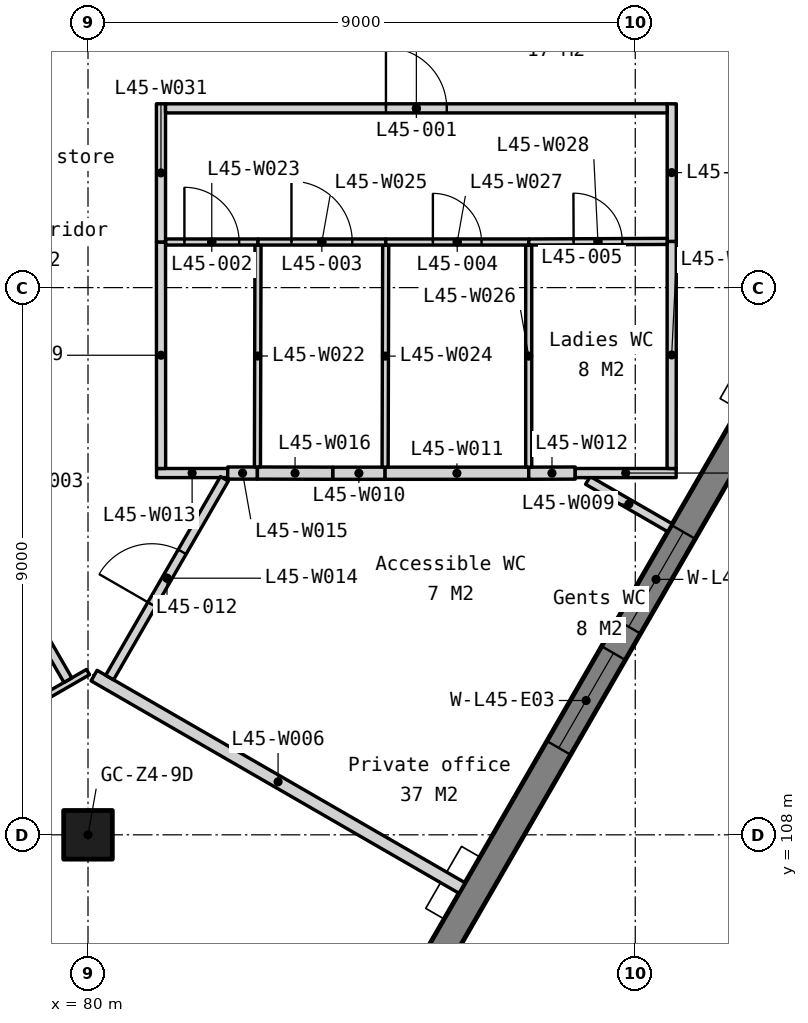
"""IFC4 building model, lengths in metres.
Left out: names, types, materials, properties, quantities, classifications, styles, units other than length and angle.
Written with IfcOpenShell. Run it as: python <this file> out.ifc"""

import sys

from ifc_helpers import new_model, si_unit, direction, frame, frame_2d, origin, origin_2d, place, context, subcontext, project, spatial, polyline, rectangle, outline, extrude, element, fill, save


model = new_model("IFC4")
c1 = context("Model", 3, precision=1e-05, world=origin(), true_north=direction((0.0, 1.0)))
c2 = subcontext(c1, "Body", "Model", "MODEL_VIEW")
j1 = project(units=[si_unit("LENGTHUNIT", "METRE"), si_unit("PLANEANGLEUNIT", "RADIAN")], contexts=[c1])
p1 = place(None, origin())
s1 = spatial("IfcSite", under=j1, at=p1, CompositionType="ELEMENT")
p2 = place(p1, origin())
s2 = spatial("IfcBuilding", under=s1, at=p2, CompositionType="ELEMENT")
p3 = place(p2, frame((0.0, 0.0, 180.2)))
s3 = spatial("IfcBuildingStorey", under=s2, at=p3, CompositionType="ELEMENT", Elevation=180.2)
p4 = place(p3, frame((80.0, 108.0, 0.0), z_axis=(0.0, 0.0, 1.0), x_axis=(1.0, 0.0, 0.0)))
e1 = element("IfcColumn", 1, at=p4, inside=s3, PredefinedType="COLUMN", context=c2, shape_type="SweptSolid", body=[
    extrude(rectangle(XDim=0.8, YDim=0.8, at=origin_2d()), origin(), (0.0, 0.0, 1.0), 3.9),
])
p5 = place(p3, frame((81.505, 98.627, -0.45), z_axis=(0.0, 0.0, 1.0), x_axis=(0.500002199942, 0.866024133644, 0.0)))
e2 = element("IfcWall", 2, at=p5, inside=s3, PredefinedType="SOLIDWALL", context=c2, shape_type="SweptSolid", body=[
    extrude(outline(polyline([(38.729, 0.0), (38.729, 4.2), (0.0, 4.2), (0.0, 0.0), (38.729, 0.0)])), frame((0.0, 0.225, 0.0), z_axis=(0.0, -1.0, 0.0), x_axis=(1.0, 0.0, 0.0)), (0.0, 0.0, 1.0), 0.45),
])
p6 = place(p5, frame((2.791, 0.0, 1.25)))
e3 = element("IfcOpeningElement", 3, at=p6, cuts=e2, PredefinedType="OPENING", context=c2, shape_type="SweptSolid", body=[
    extrude(rectangle(XDim=1.8, YDim=2.2, at=frame_2d((0.9, 1.1))), frame((0.0, 0.235, 0.0), z_axis=(0.0, -1.0, 0.0), x_axis=(1.0, 0.0, 0.0)), (0.0, 0.0, 1.0), 0.47),
])
p7 = place(p5, frame((5.091, 0.0, 1.25)))
e4 = element("IfcOpeningElement", 4, at=p7, cuts=e2, PredefinedType="OPENING", context=c2, shape_type="SweptSolid", body=[
    extrude(rectangle(XDim=1.8, YDim=2.2, at=frame_2d((0.9, 1.1))), frame((0.0, 0.235, 0.0), z_axis=(0.0, -1.0, 0.0), x_axis=(1.0, 0.0, 0.0)), (0.0, 0.0, 1.0), 0.47),
])
p8 = place(p5, frame((12.473, 0.0, 1.25)))
e5 = element("IfcOpeningElement", 5, at=p8, cuts=e2, PredefinedType="OPENING", context=c2, shape_type="SweptSolid", body=[
    extrude(rectangle(XDim=1.8, YDim=2.2, at=frame_2d((0.9, 1.1))), frame((0.0, 0.235, 0.0), z_axis=(0.0, -1.0, 0.0), x_axis=(1.0, 0.0, 0.0)), (0.0, 0.0, 1.0), 0.47),
])
p9 = place(p5, frame((14.773, 0.0, 1.25)))
e6 = element("IfcOpeningElement", 6, at=p9, cuts=e2, PredefinedType="OPENING", context=c2, shape_type="SweptSolid", body=[
    extrude(rectangle(XDim=1.8, YDim=2.2, at=frame_2d((0.9, 1.1))), frame((0.0, 0.235, 0.0), z_axis=(0.0, -1.0, 0.0), x_axis=(1.0, 0.0, 0.0)), (0.0, 0.0, 1.0), 0.47),
])
p10 = place(p5, frame((22.156, 0.0, 1.25)))
e7 = element("IfcOpeningElement", 7, at=p10, cuts=e2, PredefinedType="OPENING", context=c2, shape_type="SweptSolid", body=[
    extrude(rectangle(XDim=1.8, YDim=2.2, at=frame_2d((0.9, 1.1))), frame((0.0, 0.235, 0.0), z_axis=(0.0, -1.0, 0.0), x_axis=(1.0, 0.0, 0.0)), (0.0, 0.0, 1.0), 0.47),
])
p11 = place(p5, frame((24.456, 0.0, 1.25)))
e8 = element("IfcOpeningElement", 8, at=p11, cuts=e2, PredefinedType="OPENING", context=c2, shape_type="SweptSolid", body=[
    extrude(rectangle(XDim=1.8, YDim=2.2, at=frame_2d((0.9, 1.1))), frame((0.0, 0.235, 0.0), z_axis=(0.0, -1.0, 0.0), x_axis=(1.0, 0.0, 0.0)), (0.0, 0.0, 1.0), 0.47),
])
p12 = place(p5, frame((31.838, 0.0, 1.25)))
e9 = element("IfcOpeningElement", 9, at=p12, cuts=e2, PredefinedType="OPENING", context=c2, shape_type="SweptSolid", body=[
    extrude(rectangle(XDim=1.8, YDim=2.2, at=frame_2d((0.9, 1.1))), frame((0.0, 0.235, 0.0), z_axis=(0.0, -1.0, 0.0), x_axis=(1.0, 0.0, 0.0)), (0.0, 0.0, 1.0), 0.47),
])
p13 = place(p5, frame((34.138, 0.0, 1.25)))
e10 = element("IfcOpeningElement", 10, at=p13, cuts=e2, PredefinedType="OPENING", context=c2, shape_type="SweptSolid", body=[
    extrude(rectangle(XDim=1.8, YDim=2.2, at=frame_2d((0.9, 1.1))), frame((0.0, 0.235, 0.0), z_axis=(0.0, -1.0, 0.0), x_axis=(1.0, 0.0, 0.0)), (0.0, 0.0, 1.0), 0.47),
])
p14 = place(p3, frame((73.849, 107.125, 0.0), z_axis=(0.0, 0.0, 1.0), x_axis=(0.866024174161, 0.500002129764, 0.0)))
e11 = element("IfcWall", 11, at=p14, inside=s3, PredefinedType="PARTITIONING", context=c2, shape_type="SweptSolid", body=[
    extrude(rectangle(XDim=7.103, YDim=0.1, at=frame_2d((3.552, 0.0))), origin(), (0.0, 0.0, 1.0), 3.75),
])
p15 = place(p14, frame((3.102, 0.0, 0.0)))
e12 = element("IfcOpeningElement", 12, at=p15, cuts=e11, PredefinedType="OPENING", context=c2, shape_type="SweptSolid", body=[
    extrude(rectangle(XDim=0.9, YDim=2.1, at=frame_2d((0.45, 1.05))), frame((0.0, 0.06, 0.0), z_axis=(0.0, -1.0, 0.0), x_axis=(1.0, 0.0, 0.0)), (0.0, 0.0, 1.0), 0.12),
])
p16 = place(p3, frame((77.274, 114.693, 0.0), z_axis=(0.0, 0.0, 1.0), x_axis=(0.499997407846, -0.86602690036, 0.0)))
e13 = element("IfcWall", 13, at=p16, inside=s3, PredefinedType="PARTITIONING", context=c2, shape_type="SweptSolid", body=[
    extrude(rectangle(XDim=4.791, YDim=0.15, at=frame_2d((2.396, 0.0))), origin(), (0.0, 0.0, 1.0), 3.75),
])
p17 = place(p16, frame((1.896, 0.0, 0.0)))
e14 = element("IfcOpeningElement", 14, at=p17, cuts=e13, PredefinedType="OPENING", context=c2, shape_type="SweptSolid", body=[
    extrude(rectangle(XDim=1.0, YDim=2.1, at=frame_2d((0.5, 1.05))), frame((0.0, 0.085, 0.0), z_axis=(0.0, -1.0, 0.0), x_axis=(1.0, 0.0, 0.0)), (0.0, 0.0, 1.0), 0.17),
])
p18 = place(p3, frame((80.1, 110.619, 0.0), z_axis=(0.0, 0.0, 1.0), x_axis=(0.866028486751, -0.499994660107, 0.0)))
e15 = element("IfcWall", 15, at=p18, inside=s3, PredefinedType="PARTITIONING", context=c2, shape_type="SweptSolid", body=[
    extrude(rectangle(XDim=6.987, YDim=0.2, at=frame_2d((3.494, 0.0))), origin(), (0.0, 0.0, 1.0), 3.75),
])
p19 = place(p3, frame((88.221, 113.83, 0.0), z_axis=(0.0, 0.0, 1.0), x_axis=(0.865997745606, -0.500047902311, 0.0)))
e16 = element("IfcWall", 16, at=p19, inside=s3, PredefinedType="PARTITIONING", context=c2, shape_type="SweptSolid", body=[
    extrude(rectangle(XDim=1.558, YDim=0.15, at=frame_2d((0.779, 0.0))), origin(), (0.0, 0.0, 1.0), 3.75),
])
p20 = place(p3, frame((84.024, 113.947, 0.0), z_axis=(0.0, 0.0, 1.0), x_axis=(1.0, 0.0, 0.0)))
e17 = element("IfcWall", 17, at=p20, inside=s3, PredefinedType="PARTITIONING", context=c2, shape_type="SweptSolid", body=[
    extrude(rectangle(XDim=0.862, YDim=0.2, at=frame_2d((0.431, 0.0))), origin(), (0.0, 0.0, 1.0), 3.75),
])
p21 = place(p3, frame((84.886, 113.947, 0.0), z_axis=(0.0, 0.0, 1.0), x_axis=(1.0, 0.0, 0.0)))
e18 = element("IfcWall", 18, at=p21, inside=s3, PredefinedType="PARTITIONING", context=c2, shape_type="SweptSolid", body=[
    extrude(rectangle(XDim=2.362, YDim=0.2, at=frame_2d((1.181, 0.0))), origin(), (0.0, 0.0, 1.0), 3.75),
])
p22 = place(p3, frame((87.248, 113.947, 0.0), z_axis=(0.0, 0.0, 1.0), x_axis=(0.9999926602, 0.003831389503, 0.0)))
e19 = element("IfcWall", 19, at=p22, inside=s3, PredefinedType="PARTITIONING", context=c2, shape_type="SweptSolid", body=[
    extrude(rectangle(XDim=0.765, YDim=0.2, at=frame_2d((0.382, 0.0))), origin(), (0.0, 0.0, 1.0), 3.75),
])
p23 = place(p3, frame((81.127, 113.95, 0.0), z_axis=(0.0, 0.0, 1.0), x_axis=(1.0, 0.0, 0.0)))
e20 = element("IfcWall", 20, at=p23, inside=s3, PredefinedType="PARTITIONING", context=c2, shape_type="SweptSolid", body=[
    extrude(rectangle(XDim=1.17, YDim=0.15, at=frame_2d((0.585, 0.0))), origin(), (0.0, 0.0, 1.0), 3.75),
])
p24 = place(p3, frame((80.356, 110.587, 0.0), z_axis=(0.0, 0.0, 1.0), x_axis=(0.500008086624, 0.86602073492, 0.0)))
e21 = element("IfcWall", 21, at=p24, inside=s3, PredefinedType="PARTITIONING", context=c2, shape_type="SweptSolid", body=[
    extrude(rectangle(XDim=3.773, YDim=0.15, at=frame_2d((1.887, 0.0))), origin(), (0.0, 0.0, 1.0), 3.75),
])
p25 = place(p24, frame((1.387, 0.0, 0.0)))
e22 = element("IfcOpeningElement", 22, at=p25, cuts=e21, PredefinedType="OPENING", context=c2, shape_type="SweptSolid", body=[
    extrude(rectangle(XDim=1.0, YDim=2.1, at=frame_2d((0.5, 1.05))), frame((0.0, 0.085, 0.0), z_axis=(0.0, -1.0, 0.0), x_axis=(1.0, 0.0, 0.0)), (0.0, 0.0, 1.0), 0.17),
])
p26 = place(p3, frame((82.297, 113.95, 0.0), z_axis=(0.0, 0.0, 1.0), x_axis=(1.0, 0.0, 0.0)))
e23 = element("IfcWall", 23, at=p26, inside=s3, PredefinedType="PARTITIONING", context=c2, shape_type="SweptSolid", body=[
    extrude(rectangle(XDim=0.489, YDim=0.2, at=frame_2d((0.244, 0.0))), origin(), (0.0, 0.0, 1.0), 3.75),
])
p27 = place(p3, frame((82.786, 113.95, 0.0), z_axis=(0.0, 0.0, 1.0), x_axis=(0.999997200094, -0.002366390535, 0.0)))
e24 = element("IfcWall", 24, at=p27, inside=s3, PredefinedType="PARTITIONING", context=c2, shape_type="SweptSolid", body=[
    extrude(rectangle(XDim=1.238, YDim=0.2, at=frame_2d((0.619, 0.0))), origin(), (0.0, 0.0, 1.0), 3.75),
])
p28 = place(p3, frame((88.013, 113.95, 0.0), z_axis=(0.0, 0.0, 1.0), x_axis=(1.0, 0.0, 0.0)))
e25 = element("IfcWall", 25, at=p28, inside=s3, PredefinedType="PARTITIONING", context=c2, shape_type="SweptSolid", body=[
    extrude(rectangle(XDim=1.66, YDim=0.15, at=frame_2d((0.83, 0.0))), origin(), (0.0, 0.0, 1.0), 3.75),
])
p29 = place(p3, frame((89.598, 114.025, 0.0), z_axis=(0.0, 0.0, 1.0), x_axis=(0.000588273642, 0.999999826967, 0.0)))
e26 = element("IfcWall", 26, at=p29, inside=s3, PredefinedType="PARTITIONING", context=c2, shape_type="SweptSolid", body=[
    extrude(rectangle(XDim=3.735, YDim=0.15, at=frame_2d((1.868, 0.0))), origin(), (0.0, 0.0, 1.0), 3.75),
])
p30 = place(p3, frame((89.6, 117.76, 0.0), z_axis=(0.0, 0.0, 1.0), x_axis=(0.0, 1.0, 0.0)))
e27 = element("IfcWall", 27, at=p30, inside=s3, PredefinedType="PARTITIONING", context=c2, shape_type="SweptSolid", body=[
    extrude(rectangle(XDim=2.263, YDim=0.15, at=frame_2d((1.131, 0.0))), origin(), (0.0, 0.0, 1.0), 3.75),
])
p31 = place(p3, frame((82.786, 114.05, 0.0), z_axis=(0.0, 0.0, 1.0), x_axis=(0.002608686776, 0.999996597371, 0.0)))
e28 = element("IfcWall", 28, at=p31, inside=s3, PredefinedType="PARTITIONING", context=c2, shape_type="SweptSolid", body=[
    extrude(rectangle(XDim=3.65, YDim=0.1, at=frame_2d((1.825, 0.0))), origin(), (0.0, 0.0, 1.0), 3.75),
])
p32 = place(p3, frame((81.275, 117.75, 0.0), z_axis=(0.0, 0.0, 1.0), x_axis=(1.0, 0.0, 0.0)))
e29 = element("IfcWall", 29, at=p32, inside=s3, PredefinedType="PARTITIONING", context=c2, shape_type="SweptSolid", body=[
    extrude(rectangle(XDim=1.521, YDim=0.1, at=frame_2d((0.76, 0.0))), origin(), (0.0, 0.0, 1.0), 3.75),
])
p33 = place(p32, frame((0.311, 0.0, 0.0)))
e30 = element("IfcOpeningElement", 30, at=p33, cuts=e29, PredefinedType="OPENING", context=c2, shape_type="SweptSolid", body=[
    extrude(rectangle(XDim=0.9, YDim=2.1, at=frame_2d((0.45, 1.05))), frame((0.0, 0.06, 0.0), z_axis=(0.0, -1.0, 0.0), x_axis=(1.0, 0.0, 0.0)), (0.0, 0.0, 1.0), 0.12),
])
p34 = place(p3, frame((84.886, 114.047, 0.0), z_axis=(0.0, 0.0, 1.0), x_axis=(0.00260659454, 0.999996602827, 0.0)))
e31 = element("IfcWall", 31, at=p34, inside=s3, PredefinedType="PARTITIONING", context=c2, shape_type="SweptSolid", body=[
    extrude(rectangle(XDim=3.653, YDim=0.1, at=frame_2d((1.826, 0.0))), origin(), (0.0, 0.0, 1.0), 3.75),
])
p35 = place(p3, frame((82.796, 117.75, 0.0), z_axis=(0.0, 0.0, 1.0), x_axis=(1.0, 0.0, 0.0)))
e32 = element("IfcWall", 32, at=p35, inside=s3, PredefinedType="PARTITIONING", context=c2, shape_type="SweptSolid", body=[
    extrude(rectangle(XDim=2.1, YDim=0.1, at=frame_2d((1.05, 0.0))), origin(), (0.0, 0.0, 1.0), 3.75),
])
p36 = place(p35, frame((0.55, 0.0, 0.0)))
e33 = element("IfcOpeningElement", 33, at=p36, cuts=e32, PredefinedType="OPENING", context=c2, shape_type="SweptSolid", body=[
    extrude(rectangle(XDim=1.0, YDim=2.1, at=frame_2d((0.5, 1.05))), frame((0.0, 0.06, 0.0), z_axis=(0.0, -1.0, 0.0), x_axis=(1.0, 0.0, 0.0)), (0.0, 0.0, 1.0), 0.12),
])
p37 = place(p3, frame((87.248, 114.047, 0.0), z_axis=(0.0, 0.0, 1.0), x_axis=(0.0, 1.0, 0.0)))
e34 = element("IfcWall", 34, at=p37, inside=s3, PredefinedType="PARTITIONING", context=c2, shape_type="SweptSolid", body=[
    extrude(rectangle(XDim=3.653, YDim=0.1, at=frame_2d((1.826, 0.0))), origin(), (0.0, 0.0, 1.0), 3.75),
])
p38 = place(p3, frame((84.896, 117.75, 0.0), z_axis=(0.0, 0.0, 1.0), x_axis=(1.0, 0.0, 0.0)))
e35 = element("IfcWall", 35, at=p38, inside=s3, PredefinedType="PARTITIONING", context=c2, shape_type="SweptSolid", body=[
    extrude(rectangle(XDim=2.352, YDim=0.1, at=frame_2d((1.176, 0.0))), origin(), (0.0, 0.0, 1.0), 3.75),
])
p39 = place(p38, frame((0.776, 0.0, 0.0)))
e36 = element("IfcOpeningElement", 36, at=p39, cuts=e35, PredefinedType="OPENING", context=c2, shape_type="SweptSolid", body=[
    extrude(rectangle(XDim=0.8, YDim=2.1, at=frame_2d((0.4, 1.05))), frame((0.0, 0.06, 0.0), z_axis=(0.0, -1.0, 0.0), x_axis=(1.0, 0.0, 0.0)), (0.0, 0.0, 1.0), 0.12),
])
p40 = place(p3, frame((87.248, 117.75, 0.0), z_axis=(0.0, 0.0, 1.0), x_axis=(0.999990802005, 0.00428904483, 0.0)))
e37 = element("IfcWall", 37, at=p40, inside=s3, PredefinedType="PARTITIONING", context=c2, shape_type="SweptSolid", body=[
    extrude(rectangle(XDim=2.277, YDim=0.1, at=frame_2d((1.138, 0.0))), origin(), (0.0, 0.0, 1.0), 3.75),
])
p41 = place(p40, frame((0.739, 0.0, 0.0)))
e38 = element("IfcOpeningElement", 38, at=p41, cuts=e37, PredefinedType="OPENING", context=c2, shape_type="SweptSolid", body=[
    extrude(rectangle(XDim=0.8, YDim=2.1, at=frame_2d((0.4, 1.05))), frame((0.0, 0.06, 0.0), z_axis=(0.0, -1.0, 0.0), x_axis=(1.0, 0.0, 0.0)), (0.0, 0.0, 1.0), 0.12),
])
p42 = place(p3, frame((81.202, 114.025, 0.0), z_axis=(0.0, 0.0, 1.0), x_axis=(-0.000524315041, 0.999999862547, 0.0)))
e39 = element("IfcWall", 39, at=p42, inside=s3, PredefinedType="PARTITIONING", context=c2, shape_type="SweptSolid", body=[
    extrude(rectangle(XDim=3.725, YDim=0.15, at=frame_2d((1.863, 0.0))), origin(), (0.0, 0.0, 1.0), 3.75),
])
p43 = place(p3, frame((81.2, 117.75, 0.0), z_axis=(0.0, 0.0, 1.0), x_axis=(0.0, 1.0, 0.0)))
e40 = element("IfcWall", 40, at=p43, inside=s3, PredefinedType="PARTITIONING", context=c2, shape_type="SweptSolid", body=[
    extrude(rectangle(XDim=2.273, YDim=0.15, at=frame_2d((1.136, 0.0))), origin(), (0.0, 0.0, 1.0), 3.75),
])
p44 = place(p3, frame((81.275, 119.948, 0.0), z_axis=(0.0, 0.0, 1.0), x_axis=(1.0, 0.0, 0.0)))
e41 = element("IfcWall", 41, at=p44, inside=s3, PredefinedType="PARTITIONING", context=c2, shape_type="SweptSolid", body=[
    extrude(rectangle(XDim=8.25, YDim=0.15, at=frame_2d((4.125, 0.0))), origin(), (0.0, 0.0, 1.0), 3.75),
])
p45 = place(p44, frame((3.625, 0.0, 0.0)))
e42 = element("IfcOpeningElement", 42, at=p45, cuts=e41, PredefinedType="OPENING", context=c2, shape_type="SweptSolid", body=[
    extrude(rectangle(XDim=1.0, YDim=2.1, at=frame_2d((0.5, 1.05))), frame((0.0, 0.085, 0.0), z_axis=(0.0, -1.0, 0.0), x_axis=(1.0, 0.0, 0.0)), (0.0, 0.0, 1.0), 0.17),
])
p46 = place(p8, origin())
e43 = element("IfcWindow", 43, at=p46, inside=s3, PartitioningType="SINGLE_PANEL", PredefinedType="WINDOW", context=c2, shape_type="SweptSolid", body=[
    extrude(rectangle(XDim=1.8, YDim=2.2, at=frame_2d((0.9, 1.1))), frame((0.0, 0.03, 0.0), z_axis=(0.0, -1.0, 0.0), x_axis=(1.0, 0.0, 0.0)), (0.0, 0.0, 1.0), 0.06),
])
fill(e5, e43)
p47 = place(p9, origin())
e44 = element("IfcWindow", 44, at=p47, inside=s3, PartitioningType="SINGLE_PANEL", PredefinedType="WINDOW", context=c2, shape_type="SweptSolid", body=[
    extrude(rectangle(XDim=1.8, YDim=2.2, at=frame_2d((0.9, 1.1))), frame((0.0, 0.03, 0.0), z_axis=(0.0, -1.0, 0.0), x_axis=(1.0, 0.0, 0.0)), (0.0, 0.0, 1.0), 0.06),
])
fill(e6, e44)
p48 = place(p45, origin())
e45 = element("IfcDoor", 45, at=p48, inside=s3, OperationType="SINGLE_SWING_LEFT", PredefinedType="DOOR", context=c2, shape_type="SweptSolid", body=[
    extrude(rectangle(XDim=1.0, YDim=2.1, at=frame_2d((0.5, 1.05))), frame((0.0, 0.025, 0.0), z_axis=(0.0, -1.0, 0.0), x_axis=(1.0, 0.0, 0.0)), (0.0, 0.0, 1.0), 0.05),
])
fill(e42, e45)
p49 = place(p33, origin())
e46 = element("IfcDoor", 46, at=p49, inside=s3, OperationType="SINGLE_SWING_LEFT", PredefinedType="DOOR", context=c2, shape_type="SweptSolid", body=[
    extrude(rectangle(XDim=0.9, YDim=2.1, at=frame_2d((0.45, 1.05))), frame((0.0, 0.025, 0.0), z_axis=(0.0, -1.0, 0.0), x_axis=(1.0, 0.0, 0.0)), (0.0, 0.0, 1.0), 0.05),
])
fill(e30, e46)
p50 = place(p36, origin())
e47 = element("IfcDoor", 47, at=p50, inside=s3, OperationType="SINGLE_SWING_LEFT", PredefinedType="DOOR", context=c2, shape_type="SweptSolid", body=[
    extrude(rectangle(XDim=1.0, YDim=2.1, at=frame_2d((0.5, 1.05))), frame((0.0, 0.025, 0.0), z_axis=(0.0, -1.0, 0.0), x_axis=(1.0, 0.0, 0.0)), (0.0, 0.0, 1.0), 0.05),
])
fill(e33, e47)
p51 = place(p39, origin())
e48 = element("IfcDoor", 48, at=p51, inside=s3, OperationType="SINGLE_SWING_LEFT", PredefinedType="DOOR", context=c2, shape_type="SweptSolid", body=[
    extrude(rectangle(XDim=0.8, YDim=2.1, at=frame_2d((0.4, 1.05))), frame((0.0, 0.025, 0.0), z_axis=(0.0, -1.0, 0.0), x_axis=(1.0, 0.0, 0.0)), (0.0, 0.0, 1.0), 0.05),
])
fill(e36, e48)
p52 = place(p41, origin())
e49 = element("IfcDoor", 49, at=p52, inside=s3, OperationType="SINGLE_SWING_LEFT", PredefinedType="DOOR", context=c2, shape_type="SweptSolid", body=[
    extrude(rectangle(XDim=0.8, YDim=2.1, at=frame_2d((0.4, 1.05))), frame((0.0, 0.025, 0.0), z_axis=(0.0, -1.0, 0.0), x_axis=(1.0, 0.0, 0.0)), (0.0, 0.0, 1.0), 0.05),
])
fill(e38, e49)
p53 = place(p25, origin())
e50 = element("IfcDoor", 50, at=p53, inside=s3, OperationType="SINGLE_SWING_LEFT", PredefinedType="DOOR", context=c2, shape_type="SweptSolid", body=[
    extrude(rectangle(XDim=1.0, YDim=2.1, at=frame_2d((0.5, 1.05))), frame((0.0, 0.025, 0.0), z_axis=(0.0, -1.0, 0.0), x_axis=(1.0, 0.0, 0.0)), (0.0, 0.0, 1.0), 0.05),
])
fill(e22, e50)
save(model, sys.argv[1])
